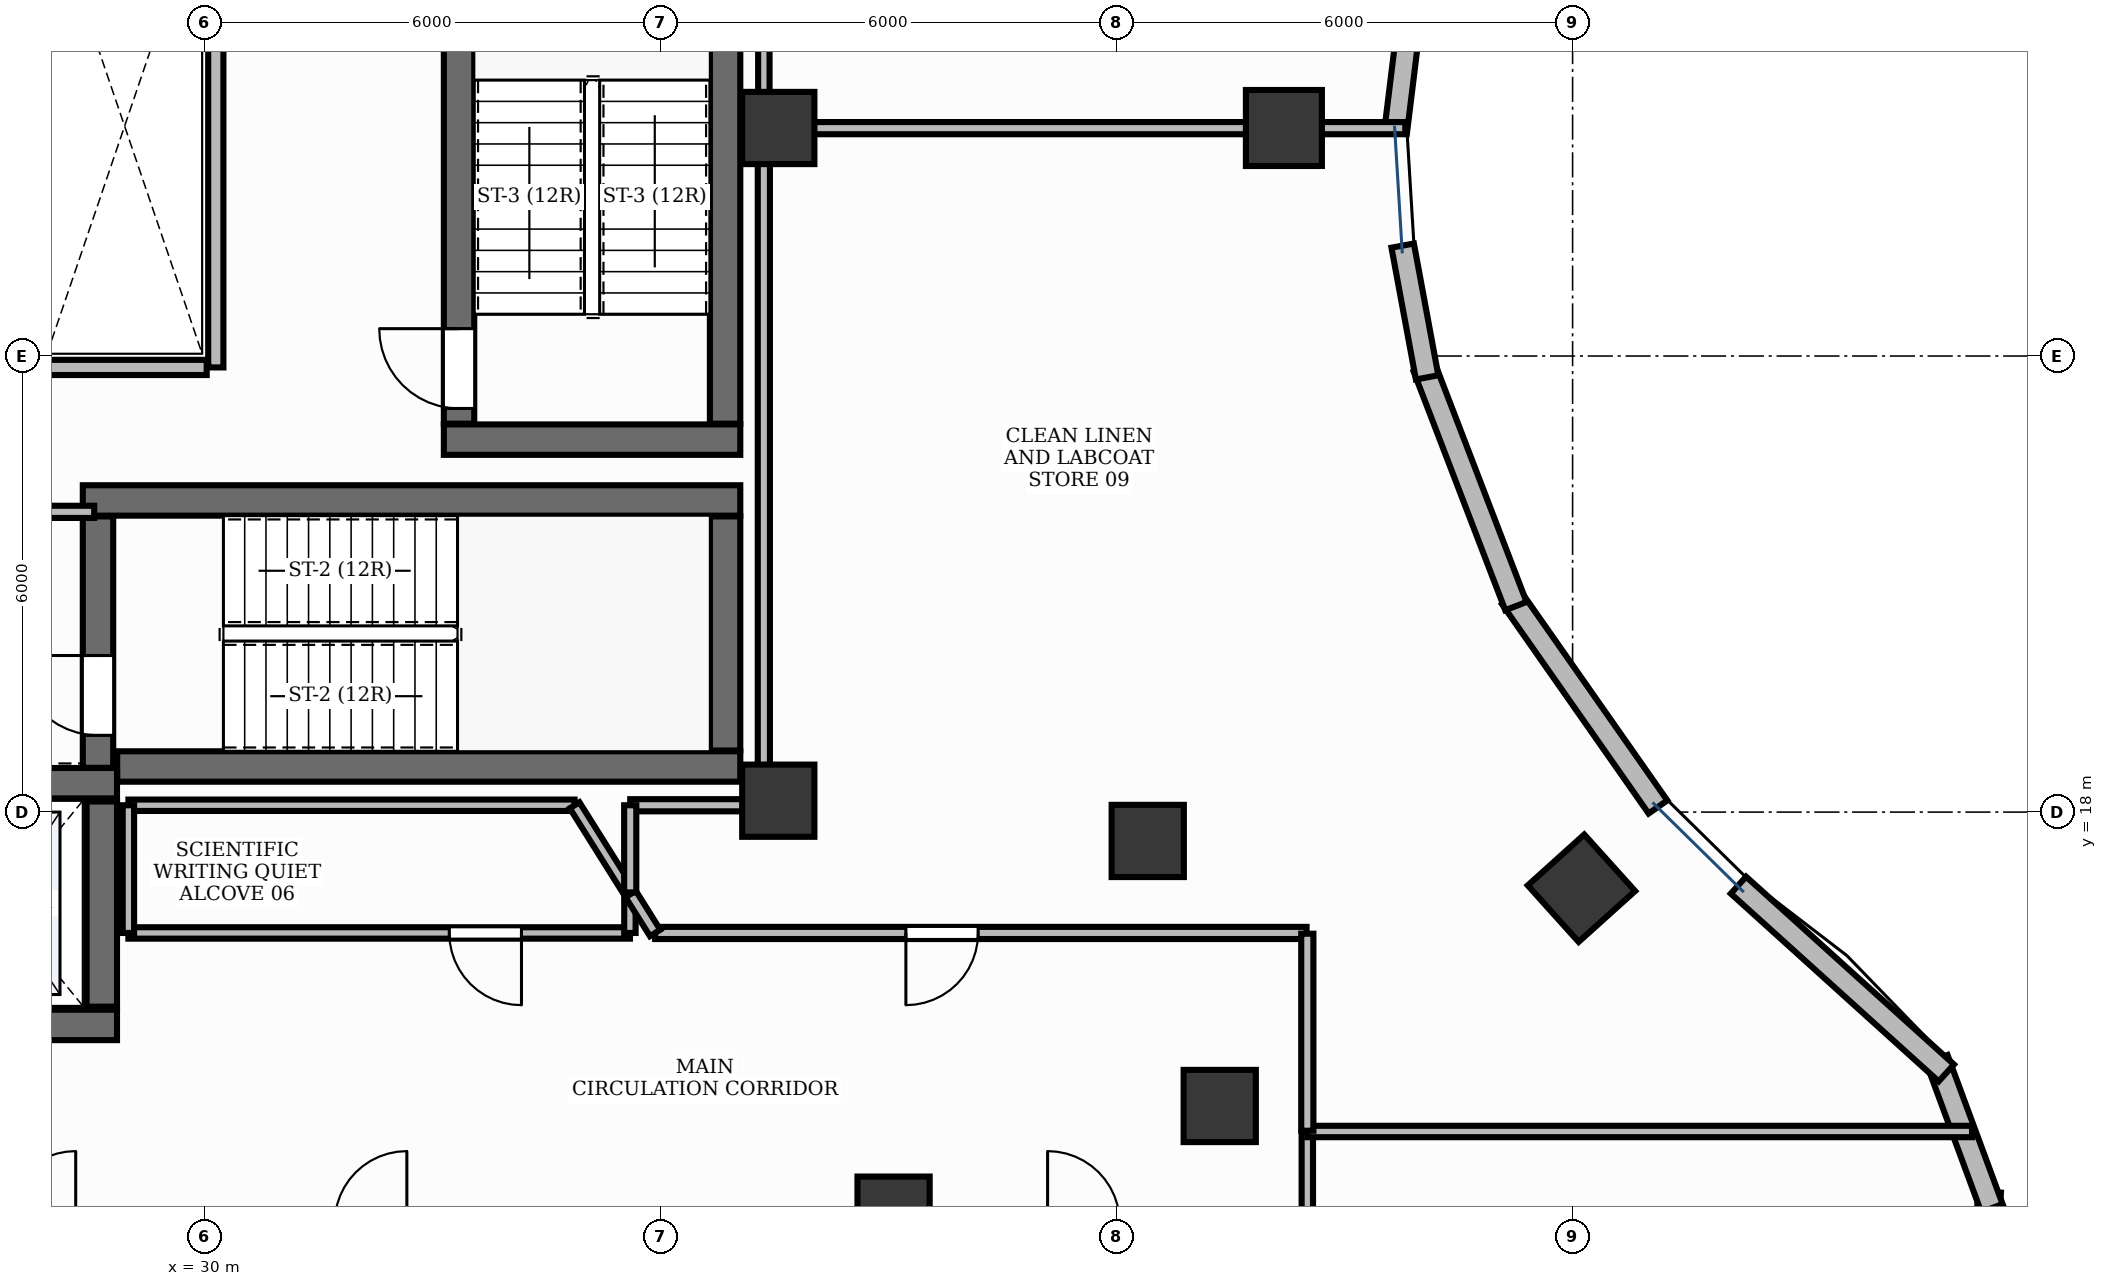
"""IFC4 building model, lengths in metres.
Left out: names, types, materials, properties, quantities, classifications, styles, units other than length and angle.
Written with IfcOpenShell. Run it as: python <this file> out.ifc"""

import sys

from ifc_helpers import new_model, si_unit, direction, frame, frame_2d, origin, origin_2d, place, context, subcontext, project, spatial, rectangle, extrude, element, fill, save


model = new_model("IFC4")
c1 = context("Model", 3, precision=1e-05, world=origin(), true_north=direction((0.0, 1.0)))
c2 = subcontext(c1, "Body", "Model", "MODEL_VIEW")
j1 = project(units=[si_unit("LENGTHUNIT", "METRE"), si_unit("PLANEANGLEUNIT", "RADIAN")], contexts=[c1])
p1 = place(None, origin())
s1 = spatial("IfcSite", under=j1, at=p1, CompositionType="ELEMENT")
p2 = place(p1, origin())
s2 = spatial("IfcBuilding", under=s1, at=p2, CompositionType="ELEMENT")
p3 = place(p2, frame((0.0, 0.0, 239.4)))
s3 = spatial("IfcBuildingStorey", under=s2, at=p3, CompositionType="ELEMENT", Elevation=239.4)
p4 = place(p3, frame((28.852, 18.6, 0.0), z_axis=(0.0, 0.0, 1.0), x_axis=(1.0, 0.0, 0.0)))
e1 = element("IfcWall", 1, at=p4, inside=s3, PredefinedType="SHEAR", context=c2, shape_type="SweptSolid", body=[
    extrude(rectangle(XDim=8.198, YDim=0.4, at=frame_2d((4.099, 0.0))), origin(), (0.0, 0.0, 1.0), 3.9),
])
p5 = place(p3, frame((28.4, 22.1, 0.0), z_axis=(0.0, 0.0, 1.0), x_axis=(1.0, 0.0, 0.0)))
e2 = element("IfcWall", 2, at=p5, inside=s3, PredefinedType="SHEAR", context=c2, shape_type="SweptSolid", body=[
    extrude(rectangle(XDim=8.65, YDim=0.4, at=frame_2d((4.325, 0.0))), origin(), (0.0, 0.0, 1.0), 3.9),
])
p6 = place(p3, frame((36.85, 18.81, 0.0), z_axis=(0.0, 0.0, 1.0), x_axis=(0.0, 1.0, 0.0)))
e3 = element("IfcWall", 3, at=p6, inside=s3, PredefinedType="SHEAR", context=c2, shape_type="SweptSolid", body=[
    extrude(rectangle(XDim=3.08, YDim=0.4, at=frame_2d((1.54, 0.0))), origin(), (0.0, 0.0, 1.0), 3.9),
])
p7 = place(p3, frame((28.6, 18.582, 0.0), z_axis=(0.0, 0.0, 1.0), x_axis=(0.0, 1.0, 0.0)))
e4 = element("IfcWall", 4, at=p7, inside=s3, PredefinedType="SHEAR", context=c2, shape_type="SweptSolid", body=[
    extrude(rectangle(XDim=3.308, YDim=0.4, at=frame_2d((1.654, 0.0))), origin(), (0.0, 0.0, 1.0), 3.9),
])
p8 = place(p7, frame((0.428, 0.0, 0.0)))
e5 = element("IfcOpeningElement", 5, at=p8, cuts=e4, PredefinedType="OPENING", context=c2, shape_type="SweptSolid", body=[
    extrude(rectangle(XDim=1.05, YDim=2.15, at=frame_2d((0.525, 1.075))), frame((0.0, 0.215, 0.0), z_axis=(0.0, -1.0, 0.0), x_axis=(1.0, 0.0, 0.0)), (0.0, 0.0, 1.0), 0.43),
])
p9 = place(p3, frame((33.15, 22.9, 0.0), z_axis=(0.0, 0.0, 1.0), x_axis=(1.0, 0.0, 0.0)))
e6 = element("IfcWall", 6, at=p9, inside=s3, PredefinedType="SHEAR", context=c2, shape_type="SweptSolid", body=[
    extrude(rectangle(XDim=3.9, YDim=0.4, at=frame_2d((1.95, 0.0))), origin(), (0.0, 0.0, 1.0), 3.9),
])
p10 = place(p3, frame((36.85, 23.11, 0.0), z_axis=(0.0, 0.0, 1.0), x_axis=(0.0, 1.0, 0.0)))
e7 = element("IfcWall", 7, at=p10, inside=s3, PredefinedType="SHEAR", context=c2, shape_type="SweptSolid", body=[
    extrude(rectangle(XDim=7.78, YDim=0.4, at=frame_2d((3.89, 0.0))), origin(), (0.0, 0.0, 1.0), 3.9),
])
p11 = place(p3, frame((33.35, 23.11, 0.0), z_axis=(0.0, 0.0, 1.0), x_axis=(0.0, 1.0, 0.0)))
e8 = element("IfcWall", 8, at=p11, inside=s3, PredefinedType="SHEAR", context=c2, shape_type="SweptSolid", body=[
    extrude(rectangle(XDim=7.78, YDim=0.4, at=frame_2d((3.89, 0.0))), origin(), (0.0, 0.0, 1.0), 3.9),
])
p12 = place(p11, frame((0.2, 0.0, 0.0)))
e9 = element("IfcOpeningElement", 9, at=p12, cuts=e8, PredefinedType="OPENING", context=c2, shape_type="SweptSolid", body=[
    extrude(rectangle(XDim=1.05, YDim=2.15, at=frame_2d((0.525, 1.075))), frame((0.0, 0.215, 0.0), z_axis=(0.0, -1.0, 0.0), x_axis=(1.0, 0.0, 0.0)), (0.0, 0.0, 1.0), 0.43),
])
p13 = place(p3, frame((25.75, 15.2, 0.0), z_axis=(0.0, 0.0, 1.0), x_axis=(1.0, 0.0, 0.0)))
e10 = element("IfcWall", 10, at=p13, inside=s3, PredefinedType="SHEAR", context=c2, shape_type="SweptSolid", body=[
    extrude(rectangle(XDim=3.1, YDim=0.4, at=frame_2d((1.55, 0.0))), origin(), (0.0, 0.0, 1.0), 3.9),
])
p14 = place(p3, frame((25.75, 18.38, 0.0), z_axis=(0.0, 0.0, 1.0), x_axis=(1.0, 0.0, 0.0)))
e11 = element("IfcWall", 11, at=p14, inside=s3, PredefinedType="SHEAR", context=c2, shape_type="SweptSolid", body=[
    extrude(rectangle(XDim=3.1, YDim=0.4, at=frame_2d((1.55, 0.0))), origin(), (0.0, 0.0, 1.0), 3.9),
])
p15 = place(p14, frame((0.9, 0.0, 0.0)))
e12 = element("IfcOpeningElement", 12, at=p15, cuts=e11, PredefinedType="OPENING", context=c2, shape_type="SweptSolid", body=[
    extrude(rectangle(XDim=1.3, YDim=2.2, at=frame_2d((0.65, 1.1))), frame((0.0, 0.215, 0.0), z_axis=(0.0, -1.0, 0.0), x_axis=(1.0, 0.0, 0.0)), (0.0, 0.0, 1.0), 0.43),
])
p16 = place(p3, frame((28.65, 15.44, 0.0), z_axis=(0.0, 0.0, 1.0), x_axis=(0.0, 1.0, 0.0)))
e13 = element("IfcWall", 13, at=p16, inside=s3, PredefinedType="SHEAR", context=c2, shape_type="SweptSolid", body=[
    extrude(rectangle(XDim=2.7, YDim=0.4, at=frame_2d((1.35, 0.0))), origin(), (0.0, 0.0, 1.0), 3.9),
])
for number, where, z_axis, x_axis in (
    (14, (37.55, 18.15, -0.0), (0.0, 0.0, 1.0), (1.0, 0.0, 0.0)),
    (15, (37.55, 27.0, -0.0), (0.0, 0.0, 1.0), (1.0, 0.0, 0.0)),
):
    element("IfcColumn", number, at=place(p3, frame(where, z_axis=z_axis, x_axis=x_axis)), inside=s3, PredefinedType="PILASTER", context=c2, shape_type="SweptSolid", body=[
        extrude(rectangle(XDim=0.95, YDim=0.95, at=origin_2d()), origin(), (0.0, 0.0, 1.0), 3.901),
    ])
for number, where, z_axis, x_axis in (
    (16, (39.067, 12.73, -0.0), (0.0, 0.0, 1.0), (1.0, 0.0, 0.0)),
    (17, (43.358, 14.134, -0.0), (0.0, 0.0, 1.0), (1.0, 0.0, 0.0)),
):
    element("IfcColumn", number, at=place(p3, frame(where, z_axis=z_axis, x_axis=x_axis)), inside=s3, PredefinedType="COLUMN", context=c2, shape_type="SweptSolid", body=[
        extrude(rectangle(XDim=0.95, YDim=0.95, at=origin_2d()), origin(), (0.0, 0.0, 1.0), 3.901),
    ])
p17 = place(p3, frame((48.116, 16.999, -0.0), z_axis=(0.0, 0.0, 1.0), x_axis=(-0.669130606359, 0.743144825477, 0.0)))
e18 = element("IfcColumn", 18, at=p17, inside=s3, PredefinedType="COLUMN", context=c2, shape_type="SweptSolid", body=[
    extrude(rectangle(XDim=1.0, YDim=1.0, at=origin_2d()), origin(), (0.0, 0.0, 1.0), 3.901),
])
p18 = place(p3, frame((42.411, 17.62, -0.0), z_axis=(0.0, 0.0, 1.0), x_axis=(1.0, 0.0, 0.0)))
e19 = element("IfcColumn", 19, at=p18, inside=s3, PredefinedType="COLUMN", context=c2, shape_type="SweptSolid", body=[
    extrude(rectangle(XDim=0.95, YDim=0.95, at=origin_2d()), origin(), (0.0, 0.0, 1.0), 3.901),
])
p19 = place(p3, frame((44.202, 27.0, -0.0), z_axis=(0.0, 0.0, 1.0), x_axis=(0.0, 1.0, 0.0)))
e20 = element("IfcColumn", 20, at=p19, inside=s3, PredefinedType="COLUMN", context=c2, shape_type="SweptSolid", body=[
    extrude(rectangle(XDim=1.0, YDim=1.0, at=origin_2d()), origin(), (0.0, 0.0, 1.0), 3.901),
])
for number, where, z_axis, x_axis in (
    (21, (53.356, 10.915, 0.0), (0.0, 0.0, 1.0), (0.062, 0.998, 0.0)),
    (22, (53.517, 12.791, 0.0), (0.0, 0.0, 1.0), (-0.346, 0.938, 0.0)),
):
    element("IfcWall", number, at=place(p3, frame(where, z_axis=z_axis, x_axis=x_axis)), inside=s3, PredefinedType="STANDARD", context=c2, shape_type="SweptSolid", body=[
        extrude(rectangle(XDim=2.091, YDim=0.3, at=frame_2d((1.046, 0.0))), origin(), (0.0, 0.0, 1.0), 3.9),
    ])
p20 = place(p3, frame((52.917, 14.569, 0.0), z_axis=(0.0, 0.0, 1.0), x_axis=(-0.742037796493, 0.670358045059, 0.0)))
e23 = element("IfcWall", 23, at=p20, inside=s3, PredefinedType="STANDARD", context=c2, shape_type="SweptSolid", body=[
    extrude(rectangle(XDim=3.685, YDim=0.3, at=frame_2d((1.843, 0.0))), origin(), (0.0, 0.0, 1.0), 3.9),
])
p21 = place(p3, frame((49.123, 18.067, 0.0), z_axis=(0.0, 0.0, 1.0), x_axis=(-0.573598849051, 0.819136350291, 0.0)))
e24 = element("IfcWall", 24, at=p21, inside=s3, PredefinedType="STANDARD", context=c2, shape_type="SweptSolid", body=[
    extrude(rectangle(XDim=3.361, YDim=0.3, at=frame_2d((1.68, 0.0))), origin(), (0.0, 0.0, 1.0), 3.9),
])
p22 = place(p3, frame((47.254, 20.71, 0.0), z_axis=(0.0, 0.0, 1.0), x_axis=(-0.358365624917, 0.933581318835, 0.0)))
e25 = element("IfcWall", 25, at=p22, inside=s3, PredefinedType="STANDARD", context=c2, shape_type="SweptSolid", body=[
    extrude(rectangle(XDim=3.361, YDim=0.3, at=frame_2d((1.68, 0.0))), origin(), (0.0, 0.0, 1.0), 3.9),
])
p23 = place(p3, frame((46.086, 23.719, 0.0), z_axis=(0.0, 0.0, 1.0), x_axis=(-0.182198328631, 0.983261800867, 0.0)))
e26 = element("IfcWall", 26, at=p23, inside=s3, PredefinedType="STANDARD", context=c2, shape_type="SweptSolid", body=[
    extrude(rectangle(XDim=1.763, YDim=0.3, at=frame_2d((0.882, 0.0))), origin(), (0.0, 0.0, 1.0), 3.9),
])
p24 = place(p3, frame((45.67, 26.938, 0.0), z_axis=(0.0, 0.0, 1.0), x_axis=(0.121834797873, 0.992550392689, 0.0)))
e27 = element("IfcWall", 27, at=p24, inside=s3, PredefinedType="STANDARD", context=c2, shape_type="SweptSolid", body=[
    extrude(rectangle(XDim=3.361, YDim=0.3, at=frame_2d((1.68, 0.0))), origin(), (0.0, 0.0, 1.0), 3.9),
])
p25 = place(p3, frame((30.15, 23.85, 0.0), z_axis=(0.0, 0.0, 1.0), x_axis=(0.0, 1.0, 0.0)))
e28 = element("IfcWall", 28, at=p25, inside=s3, PredefinedType="PARTITIONING", context=c2, shape_type="SweptSolid", body=[
    extrude(rectangle(XDim=6.35, YDim=0.2, at=frame_2d((3.175, 0.0))), origin(), (0.0, 0.0, 1.0), 2.22),
])
p26 = place(p3, frame((27.934, 23.85, 0.0), z_axis=(0.0, 0.0, 1.0), x_axis=(1.0, 0.0, 0.0)))
e29 = element("IfcWall", 29, at=p26, inside=s3, PredefinedType="PARTITIONING", context=c2, shape_type="SweptSolid", body=[
    extrude(rectangle(XDim=2.096, YDim=0.2, at=frame_2d((1.048, 0.0))), origin(), (0.0, 0.0, 1.0), 2.22),
])
p27 = place(p3, frame((23.58, 21.95, 0.0), z_axis=(0.0, 0.0, 1.0), x_axis=(1.0, 0.0, 0.0)))
e30 = element("IfcWall", 30, at=p27, inside=s3, PredefinedType="PARTITIONING", context=c2, shape_type="SweptSolid", body=[
    extrude(rectangle(XDim=4.97, YDim=0.16, at=frame_2d((2.485, 0.0))), origin(), (0.0, 0.0, 1.0), 2.22),
])
p28 = place(p3, frame((35.598, 16.41, 0.0), z_axis=(0.0, 0.0, 1.0), x_axis=(-1.0, 0.0, 0.0)))
e31 = element("IfcWall", 31, at=p28, inside=s3, PredefinedType="PARTITIONING", context=c2, shape_type="SweptSolid", body=[
    extrude(rectangle(XDim=6.598, YDim=0.15, at=frame_2d((3.299, 0.0))), origin(), (0.0, 0.0, 1.0), 2.22),
])
p29 = place(p28, frame((1.427, 0.0, 0.0)))
e32 = element("IfcOpeningElement", 32, at=p29, cuts=e31, PredefinedType="OPENING", context=c2, shape_type="SweptSolid", body=[
    extrude(rectangle(XDim=0.95, YDim=2.15, at=frame_2d((0.475, 1.075))), frame((0.0, 0.09, 0.0), z_axis=(0.0, -1.0, 0.0), x_axis=(1.0, 0.0, 0.0)), (0.0, 0.0, 1.0), 0.18),
])
p30 = place(p3, frame((44.5, 16.41, 0.0), z_axis=(0.0, 0.0, 1.0), x_axis=(-1.0, 0.0, 0.0)))
e33 = element("IfcWall", 33, at=p30, inside=s3, PredefinedType="PARTITIONING", context=c2, shape_type="SweptSolid", body=[
    extrude(rectangle(XDim=8.571, YDim=0.16, at=frame_2d((4.285, 0.0))), origin(), (0.0, 0.0, 1.0), 2.22),
])
p31 = place(p30, frame((4.321, 0.0, 0.0)))
e34 = element("IfcOpeningElement", 34, at=p31, cuts=e33, PredefinedType="OPENING", context=c2, shape_type="SweptSolid", body=[
    extrude(rectangle(XDim=0.95, YDim=2.15, at=frame_2d((0.475, 1.075))), frame((0.0, 0.095, 0.0), z_axis=(0.0, -1.0, 0.0), x_axis=(1.0, 0.0, 0.0)), (0.0, 0.0, 1.0), 0.19),
])
p32 = place(p3, frame((29.0, 18.09, 0.0), z_axis=(0.0, 0.0, 1.0), x_axis=(1.0, 0.0, 0.0)))
e35 = element("IfcWall", 35, at=p32, inside=s3, PredefinedType="PARTITIONING", context=c2, shape_type="SweptSolid", body=[
    extrude(rectangle(XDim=5.87, YDim=0.15, at=frame_2d((2.935, 0.0))), origin(), (0.0, 0.0, 1.0), 2.22),
])
p33 = place(p3, frame((34.87, 18.09, 0.0), z_axis=(0.0, 0.0, 1.0), x_axis=(0.531521183291, -0.847044999816, 0.0)))
e36 = element("IfcWall", 36, at=p33, inside=s3, PredefinedType="PARTITIONING", context=c2, shape_type="SweptSolid", body=[
    extrude(rectangle(XDim=1.369, YDim=0.15, at=frame_2d((0.685, 0.0))), origin(), (0.0, 0.0, 1.0), 2.22),
])
p34 = place(p3, frame((35.598, 16.931, 0.0), z_axis=(0.0, 0.0, 1.0), x_axis=(0.0, -1.0, 0.0)))
e37 = element("IfcWall", 37, at=p34, inside=s3, PredefinedType="PARTITIONING", context=c2, shape_type="SweptSolid", body=[
    extrude(rectangle(XDim=0.521, YDim=0.15, at=frame_2d((0.26, 0.0))), origin(), (0.0, 0.0, 1.0), 2.22),
])
p35 = place(p3, frame((29.0, 16.41, 0.0), z_axis=(0.0, 0.0, 1.0), x_axis=(0.0, 1.0, 0.0)))
e38 = element("IfcWall", 38, at=p35, inside=s3, PredefinedType="PARTITIONING", context=c2, shape_type="SweptSolid", body=[
    extrude(rectangle(XDim=1.68, YDim=0.15, at=frame_2d((0.84, 0.0))), origin(), (0.0, 0.0, 1.0), 2.22),
])
p36 = place(p3, frame((44.51, 12.6, 0.0), z_axis=(0.0, 0.0, 1.0), x_axis=(0.0, 1.0, 0.0)))
e39 = element("IfcWall", 39, at=p36, inside=s3, PredefinedType="PARTITIONING", context=c2, shape_type="SweptSolid", body=[
    extrude(rectangle(XDim=1.198, YDim=0.15, at=frame_2d((0.599, 0.0))), origin(), (0.0, 0.0, 1.0), 2.22),
])
p37 = place(p3, frame((44.51, 13.798, 0.0), z_axis=(0.0, 0.0, 1.0), x_axis=(1.0, 0.0, 0.0)))
e40 = element("IfcWall", 40, at=p37, inside=s3, PredefinedType="PARTITIONING", context=c2, shape_type="SweptSolid", body=[
    extrude(rectangle(XDim=8.745, YDim=0.15, at=frame_2d((4.373, 0.0))), origin(), (0.0, 0.0, 1.0), 2.22),
])
p38 = place(p3, frame((35.602, 18.09, 0.0), z_axis=(0.0, 0.0, 1.0), x_axis=(1.0, 0.0, 0.0)))
e41 = element("IfcWall", 41, at=p38, inside=s3, PredefinedType="PARTITIONING", context=c2, shape_type="SweptSolid", body=[
    extrude(rectangle(XDim=1.748, YDim=0.16, at=frame_2d((0.874, 0.0))), origin(), (0.0, 0.0, 1.0), 2.22),
])
p39 = place(p3, frame((37.36, 18.1, 0.0), z_axis=(0.0, 0.0, 1.0), x_axis=(0.0, 1.0, 0.0)))
e42 = element("IfcWall", 42, at=p39, inside=s3, PredefinedType="PARTITIONING", context=c2, shape_type="SweptSolid", body=[
    extrude(rectangle(XDim=8.898, YDim=0.16, at=frame_2d((4.449, 0.0))), origin(), (0.0, 0.0, 1.0), 2.22),
])
p40 = place(p3, frame((37.36, 26.998, 0.0), z_axis=(0.0, 0.0, 1.0), x_axis=(1.0, 0.0, 0.0)))
e43 = element("IfcWall", 43, at=p40, inside=s3, PredefinedType="PARTITIONING", context=c2, shape_type="SweptSolid", body=[
    extrude(rectangle(XDim=8.439, YDim=0.16, at=frame_2d((4.219, 0.0))), origin(), (0.0, 0.0, 1.0), 2.22),
])
p41 = place(p3, frame((44.51, 13.808, 0.0), z_axis=(0.0, 0.0, 1.0), x_axis=(0.0, 1.0, 0.0)))
e44 = element("IfcWall", 44, at=p41, inside=s3, PredefinedType="PARTITIONING", context=c2, shape_type="SweptSolid", body=[
    extrude(rectangle(XDim=2.592, YDim=0.16, at=frame_2d((1.296, 0.0))), origin(), (0.0, 0.0, 1.0), 2.22),
])
p42 = place(p3, frame((35.929, 16.41, 0.0), z_axis=(0.0, 0.0, 1.0), x_axis=(-0.531667126554, 0.846953402816, 0.0)))
e45 = element("IfcWall", 45, at=p42, inside=s3, PredefinedType="PARTITIONING", context=c2, shape_type="SweptSolid", body=[
    extrude(rectangle(XDim=0.605, YDim=0.16, at=frame_2d((0.302, 0.0))), origin(), (0.0, 0.0, 1.0), 2.22),
])
p43 = place(p3, frame((35.602, 16.943, 0.0), z_axis=(0.0, 0.0, 1.0), x_axis=(0.0, 1.0, 0.0)))
e46 = element("IfcWall", 46, at=p43, inside=s3, PredefinedType="PARTITIONING", context=c2, shape_type="SweptSolid", body=[
    extrude(rectangle(XDim=1.147, YDim=0.16, at=frame_2d((0.573, 0.0))), origin(), (0.0, 0.0, 1.0), 2.22),
])
p44 = place(p3, frame((37.36, 27.052, 0.0), z_axis=(0.0, 0.0, 1.0), x_axis=(0.0, 1.0, 0.0)))
e47 = element("IfcWall", 47, at=p44, inside=s3, PredefinedType="PARTITIONING", context=c2, shape_type="SweptSolid", body=[
    extrude(rectangle(XDim=8.848, YDim=0.15, at=frame_2d((4.424, 0.0))), origin(), (0.0, 0.0, 1.0), 2.22),
])
p45 = place(p8, origin())
e48 = element("IfcDoor", 48, at=p45, inside=s3, OperationType="SINGLE_SWING_RIGHT", PredefinedType="DOOR", context=c2, shape_type="SweptSolid", body=[
    extrude(rectangle(XDim=1.05, YDim=2.15, at=frame_2d((0.525, 1.075))), frame((0.0, 0.025, 0.0), z_axis=(0.0, -1.0, 0.0), x_axis=(1.0, 0.0, 0.0)), (0.0, 0.0, 1.0), 0.05),
])
fill(e5, e48)
p46 = place(p12, origin())
e49 = element("IfcDoor", 49, at=p46, inside=s3, OperationType="SINGLE_SWING_RIGHT", PredefinedType="DOOR", context=c2, shape_type="SweptSolid", body=[
    extrude(rectangle(XDim=1.05, YDim=2.15, at=frame_2d((0.525, 1.075))), frame((0.0, 0.025, 0.0), z_axis=(0.0, -1.0, 0.0), x_axis=(1.0, 0.0, 0.0)), (0.0, 0.0, 1.0), 0.05),
])
fill(e9, e49)
p47 = place(p29, origin())
e50 = element("IfcDoor", 50, at=p47, inside=s3, OperationType="SINGLE_SWING_LEFT", PredefinedType="DOOR", context=c2, shape_type="SweptSolid", body=[
    extrude(rectangle(XDim=0.95, YDim=2.15, at=frame_2d((0.475, 1.075))), frame((0.0, 0.025, 0.0), z_axis=(0.0, -1.0, 0.0), x_axis=(1.0, 0.0, 0.0)), (0.0, 0.0, 1.0), 0.05),
])
fill(e32, e50)
p48 = place(p31, origin())
e51 = element("IfcDoor", 51, at=p48, inside=s3, OperationType="SINGLE_SWING_RIGHT", PredefinedType="DOOR", context=c2, shape_type="SweptSolid", body=[
    extrude(rectangle(XDim=0.95, YDim=2.15, at=frame_2d((0.475, 1.075))), frame((0.0, 0.025, 0.0), z_axis=(0.0, -1.0, 0.0), x_axis=(1.0, 0.0, 0.0)), (0.0, 0.0, 1.0), 0.05),
])
fill(e34, e51)
save(model, sys.argv[1])
